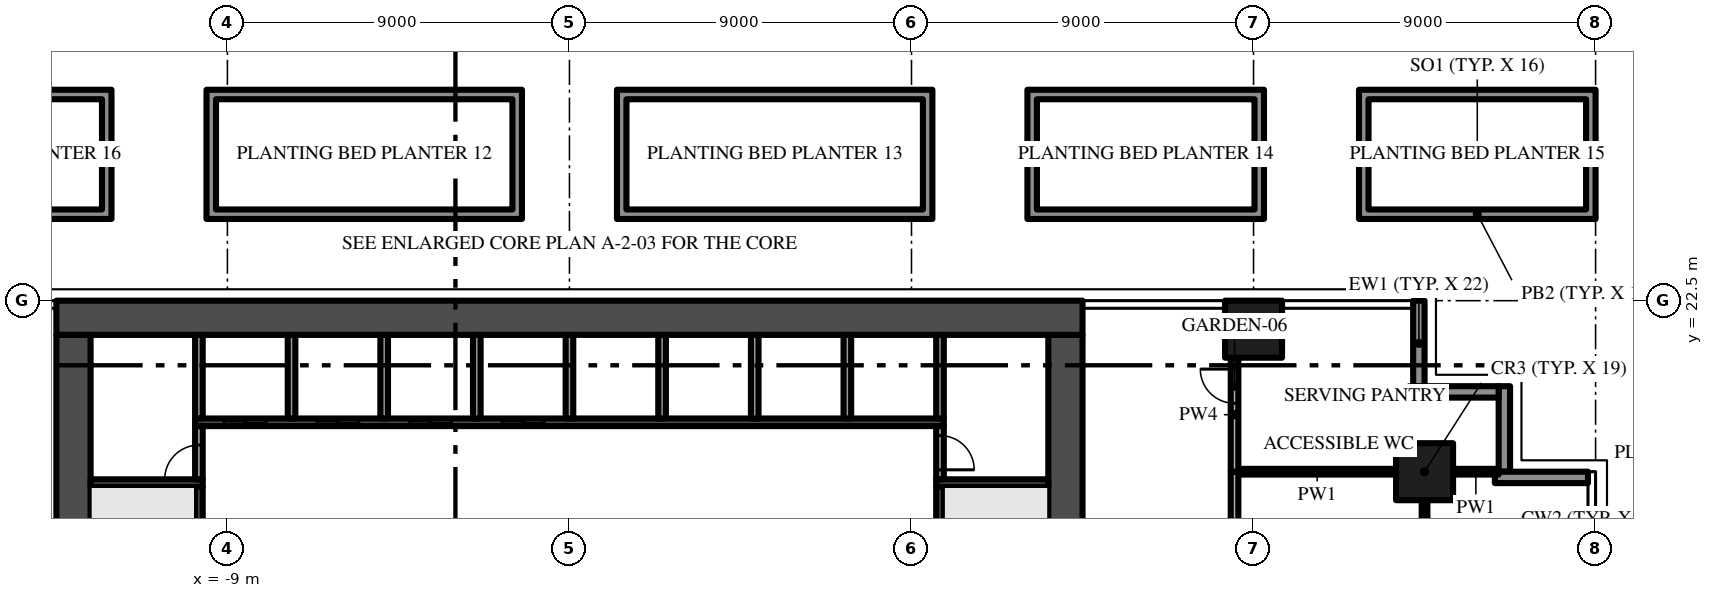
"""IFC4 building model, lengths in metres.
Left out: names, types, materials, properties, quantities, classifications, styles, units other than length and angle.
Written with IfcOpenShell. Run it as: python <this file> out.ifc"""

import sys

from ifc_helpers import new_model, si_unit, direction, frame, frame_2d, origin, origin_2d, place, context, subcontext, project, spatial, polyline, rectangle, outline, extrude, element, fill, save


model = new_model("IFC4")
c1 = context("Model", 3, precision=1e-05, world=origin(), true_north=direction((0.0, 1.0)))
c2 = subcontext(c1, "Body", "Model", "MODEL_VIEW")
j1 = project(units=[si_unit("LENGTHUNIT", "METRE"), si_unit("PLANEANGLEUNIT", "RADIAN")], contexts=[c1])
p1 = place(None, origin())
s1 = spatial("IfcSite", under=j1, at=p1, CompositionType="ELEMENT")
p2 = place(p1, origin())
s2 = spatial("IfcBuilding", under=s1, at=p2, CompositionType="ELEMENT")
p3 = place(p2, frame((0.0, 0.0, 10.5)))
s3 = spatial("IfcBuildingStorey", under=s2, at=p3, CompositionType="ELEMENT", Elevation=10.5)
p4 = place(p3, frame((13.05, 5.4, -0.35), z_axis=(0.0, 0.0, 1.0), x_axis=(0.0, 1.0, 0.0)))
e1 = element("IfcWall", 1, at=p4, inside=s3, PredefinedType="SHEAR", context=c2, shape_type="SweptSolid", body=[
    extrude(rectangle(XDim=16.2, YDim=0.9, at=frame_2d((8.1, 0.0))), origin(), (0.0, 0.0, 1.0), 4.55),
])
p5 = place(p4, frame((6.0, 0.0, 0.35)))
e2 = element("IfcOpeningElement", 2, at=p5, cuts=e1, PredefinedType="OPENING", context=c2, shape_type="SweptSolid", body=[
    extrude(rectangle(XDim=1.2, YDim=2.2, at=frame_2d((0.6, 1.1))), frame((0.0, 0.46, 0.0), z_axis=(0.0, -1.0, 0.0), x_axis=(1.0, 0.0, 0.0)), (0.0, 0.0, 1.0), 0.92),
])
p6 = place(p3, frame((13.5, 22.05, -0.35), z_axis=(0.0, 0.0, 1.0), x_axis=(-1.0, 0.0, 0.0)))
e3 = element("IfcWall", 3, at=p6, inside=s3, PredefinedType="SHEAR", context=c2, shape_type="SweptSolid", body=[
    extrude(rectangle(XDim=27.0, YDim=0.9, at=frame_2d((13.5, 0.0))), origin(), (0.0, 0.0, 1.0), 4.55),
])
p7 = place(p3, frame((-13.05, 21.6, -0.35), z_axis=(0.0, 0.0, 1.0), x_axis=(0.0, -1.0, 0.0)))
e4 = element("IfcWall", 4, at=p7, inside=s3, PredefinedType="SHEAR", context=c2, shape_type="SweptSolid", body=[
    extrude(rectangle(XDim=16.2, YDim=0.9, at=frame_2d((8.1, 0.0))), origin(), (0.0, 0.0, 1.0), 4.55),
])
p8 = place(p7, frame((9.0, 0.0, 0.35)))
e5 = element("IfcOpeningElement", 5, at=p8, cuts=e4, PredefinedType="OPENING", context=c2, shape_type="SweptSolid", body=[
    extrude(rectangle(XDim=1.2, YDim=2.2, at=frame_2d((0.6, 1.1))), frame((0.0, 0.46, 0.0), z_axis=(0.0, -1.0, 0.0), x_axis=(1.0, 0.0, 0.0)), (0.0, 0.0, 1.0), 0.92),
])
for number, where, z_axis, x_axis in (
    (6, (18.0, 21.75, 0.0), (0.0, 0.0, 1.0), (1.0, 0.0, 0.0)),
    (7, (22.5, 18.0, 0.0), (0.0, 0.0, 1.0), (1.0, 0.0, 0.0)),
):
    element("IfcColumn", number, at=place(p3, frame(where, z_axis=z_axis, x_axis=x_axis)), inside=s3, PredefinedType="COLUMN", context=c2, shape_type="SweptSolid", body=[
        extrude(rectangle(XDim=1.5, YDim=1.5, at=origin_2d()), origin(), (0.0, 0.0, 1.0), 4.2),
    ])
p9 = place(p3, frame((24.35, 17.85, 0.0), z_axis=(0.0, 0.0, 1.0), x_axis=(1.0, 0.0, 0.0)))
e8 = element("IfcWall", 8, at=p9, inside=s3, PredefinedType="SOLIDWALL", context=c2, shape_type="SweptSolid", body=[
    extrude(rectangle(XDim=2.45, YDim=0.3, at=frame_2d((1.225, 0.0))), origin(), (0.0, 0.0, 1.0), 4.2),
])
p10 = place(p3, frame((24.6, 20.25, 0.0), z_axis=(0.0, 0.0, 1.0), x_axis=(0.0, -1.0, 0.0)))
e9 = element("IfcWall", 9, at=p10, inside=s3, PredefinedType="SOLIDWALL", context=c2, shape_type="SweptSolid", body=[
    extrude(rectangle(XDim=2.25, YDim=0.3, at=frame_2d((1.125, 0.0))), origin(), (0.0, 0.0, 1.0), 4.2),
])
p11 = place(p3, frame((22.1, 20.1, 0.0), z_axis=(0.0, 0.0, 1.0), x_axis=(1.0, 0.0, 0.0)))
e10 = element("IfcWall", 10, at=p11, inside=s3, PredefinedType="SOLIDWALL", context=c2, shape_type="SweptSolid", body=[
    extrude(rectangle(XDim=2.35, YDim=0.3, at=frame_2d((1.175, 0.0))), origin(), (0.0, 0.0, 1.0), 4.2),
])
p12 = place(p3, frame((22.35, 22.5, 0.0), z_axis=(0.0, 0.0, 1.0), x_axis=(0.0, -1.0, 0.0)))
e11 = element("IfcWall", 11, at=p12, inside=s3, PredefinedType="SOLIDWALL", context=c2, shape_type="SweptSolid", body=[
    extrude(rectangle(XDim=2.25, YDim=0.3, at=frame_2d((1.125, 0.0))), origin(), (0.0, 0.0, 1.0), 4.2),
])
p13 = place(p3, frame((-12.6, 17.7, 0.0), z_axis=(0.0, 0.0, 1.0), x_axis=(1.0, 0.0, 0.0)))
e12 = element("IfcWall", 12, at=p13, inside=s3, PredefinedType="SHEAR", context=c2, shape_type="SweptSolid", body=[
    extrude(rectangle(XDim=2.95, YDim=0.2, at=frame_2d((1.475, 0.0))), origin(), (0.0, 0.0, 1.0), 4.2),
])
p14 = place(p3, frame((-9.75, 16.1, 0.0), z_axis=(0.0, 0.0, 1.0), x_axis=(0.0, 1.0, 0.0)))
e13 = element("IfcWall", 13, at=p14, inside=s3, PredefinedType="SHEAR", context=c2, shape_type="SweptSolid", body=[
    extrude(rectangle(XDim=1.5, YDim=0.2, at=frame_2d((0.75, 0.0))), origin(), (0.0, 0.0, 1.0), 4.2),
])
p15 = place(p3, frame((-9.75, 17.8, 0.0), z_axis=(0.0, 0.0, 1.0), x_axis=(0.0, 1.0, 0.0)))
e14 = element("IfcWall", 14, at=p15, inside=s3, PredefinedType="PARTITIONING", context=c2, shape_type="SweptSolid", body=[
    extrude(rectangle(XDim=1.4, YDim=0.2, at=frame_2d((0.7, 0.0))), origin(), (0.0, 0.0, 1.0), 4.2),
])
p16 = place(p15, origin())
e15 = element("IfcOpeningElement", 15, at=p16, cuts=e14, PredefinedType="OPENING", context=c2, shape_type="SweptSolid", body=[
    extrude(rectangle(XDim=0.9, YDim=2.1, at=frame_2d((0.45, 1.05))), frame((0.0, 0.11, 0.0), z_axis=(0.0, -1.0, 0.0), x_axis=(1.0, 0.0, 0.0)), (0.0, 0.0, 1.0), 0.22),
])
p17 = place(p3, frame((-9.85, 19.3, 0.0), z_axis=(0.0, 0.0, 1.0), x_axis=(1.0, 0.0, 0.0)))
e16 = element("IfcWall", 16, at=p17, inside=s3, PredefinedType="SHEAR", context=c2, shape_type="SweptSolid", body=[
    extrude(rectangle(XDim=19.7, YDim=0.2, at=frame_2d((9.85, 0.0))), origin(), (0.0, 0.0, 1.0), 4.2),
])
p18 = place(p17, frame((0.769, 0.0, 0.0)))
e17 = element("IfcOpeningElement", 17, at=p18, cuts=e16, PredefinedType="OPENING", context=c2, shape_type="SweptSolid", body=[
    extrude(rectangle(XDim=1.1, YDim=2.1, at=frame_2d((0.55, 1.05))), frame((0.0, 0.11, 0.0), z_axis=(0.0, -1.0, 0.0), x_axis=(1.0, 0.0, 0.0)), (0.0, 0.0, 1.0), 0.22),
])
p19 = place(p17, frame((3.206, 0.0, 0.0)))
e18 = element("IfcOpeningElement", 18, at=p19, cuts=e16, PredefinedType="OPENING", context=c2, shape_type="SweptSolid", body=[
    extrude(rectangle(XDim=1.1, YDim=2.1, at=frame_2d((0.55, 1.05))), frame((0.0, 0.11, 0.0), z_axis=(0.0, -1.0, 0.0), x_axis=(1.0, 0.0, 0.0)), (0.0, 0.0, 1.0), 0.22),
])
p20 = place(p17, frame((5.644, 0.0, 0.0)))
e19 = element("IfcOpeningElement", 19, at=p20, cuts=e16, PredefinedType="OPENING", context=c2, shape_type="SweptSolid", body=[
    extrude(rectangle(XDim=1.1, YDim=2.1, at=frame_2d((0.55, 1.05))), frame((0.0, 0.11, 0.0), z_axis=(0.0, -1.0, 0.0), x_axis=(1.0, 0.0, 0.0)), (0.0, 0.0, 1.0), 0.22),
])
p21 = place(p17, frame((8.081, 0.0, 0.0)))
e20 = element("IfcOpeningElement", 20, at=p21, cuts=e16, PredefinedType="OPENING", context=c2, shape_type="SweptSolid", body=[
    extrude(rectangle(XDim=1.1, YDim=2.1, at=frame_2d((0.55, 1.05))), frame((0.0, 0.11, 0.0), z_axis=(0.0, -1.0, 0.0), x_axis=(1.0, 0.0, 0.0)), (0.0, 0.0, 1.0), 0.22),
])
for number, where, z_axis, x_axis in (
    (21, (-9.75, 19.4, 0.0), (0.0, 0.0, 1.0), (0.0, 1.0, 0.0)),
    (22, (-7.312, 19.4, 0.0), (0.0, 0.0, 1.0), (0.0, 1.0, 0.0)),
    (23, (-4.875, 19.4, 0.0), (0.0, 0.0, 1.0), (0.0, 1.0, 0.0)),
    (24, (-2.438, 19.4, 0.0), (0.0, 0.0, 1.0), (0.0, 1.0, 0.0)),
    (25, (0.0, 19.4, 0.0), (0.0, 0.0, 1.0), (0.0, 1.0, 0.0)),
    (26, (2.438, 19.4, 0.0), (0.0, 0.0, 1.0), (0.0, 1.0, 0.0)),
    (27, (4.875, 19.4, 0.0), (0.0, 0.0, 1.0), (0.0, 1.0, 0.0)),
    (28, (7.312, 19.4, 0.0), (0.0, 0.0, 1.0), (0.0, 1.0, 0.0)),
):
    element("IfcWall", number, at=place(p3, frame(where, z_axis=z_axis, x_axis=x_axis)), inside=s3, PredefinedType="PARTITIONING", context=c2, shape_type="SweptSolid", body=[
        extrude(rectangle(XDim=2.2, YDim=0.2, at=frame_2d((1.1, 0.0))), origin(), (0.0, 0.0, 1.0), 4.2),
    ])
p22 = place(p3, frame((9.75, 16.1, 0.0), z_axis=(0.0, 0.0, 1.0), x_axis=(0.0, 1.0, 0.0)))
e29 = element("IfcWall", 29, at=p22, inside=s3, PredefinedType="SHEAR", context=c2, shape_type="SweptSolid", body=[
    extrude(rectangle(XDim=1.5, YDim=0.2, at=frame_2d((0.75, 0.0))), origin(), (0.0, 0.0, 1.0), 4.2),
])
p23 = place(p3, frame((9.65, 17.7, 0.0), z_axis=(0.0, 0.0, 1.0), x_axis=(1.0, 0.0, 0.0)))
e30 = element("IfcWall", 30, at=p23, inside=s3, PredefinedType="SHEAR", context=c2, shape_type="SweptSolid", body=[
    extrude(rectangle(XDim=2.95, YDim=0.2, at=frame_2d((1.475, 0.0))), origin(), (0.0, 0.0, 1.0), 4.2),
])
p24 = place(p3, frame((9.75, 19.2, 0.0), z_axis=(0.0, 0.0, 1.0), x_axis=(0.0, -1.0, 0.0)))
e31 = element("IfcWall", 31, at=p24, inside=s3, PredefinedType="PARTITIONING", context=c2, shape_type="SweptSolid", body=[
    extrude(rectangle(XDim=1.4, YDim=0.2, at=frame_2d((0.7, 0.0))), origin(), (0.0, 0.0, 1.0), 4.2),
])
p25 = place(p24, frame((0.25, 0.0, 0.0)))
e32 = element("IfcOpeningElement", 32, at=p25, cuts=e31, PredefinedType="OPENING", context=c2, shape_type="SweptSolid", body=[
    extrude(rectangle(XDim=0.9, YDim=2.1, at=frame_2d((0.45, 1.05))), frame((0.0, 0.11, 0.0), z_axis=(0.0, -1.0, 0.0), x_axis=(1.0, 0.0, 0.0)), (0.0, 0.0, 1.0), 0.22),
])
p26 = place(p3, frame((9.75, 19.4, 0.0), z_axis=(0.0, 0.0, 1.0), x_axis=(0.0, 1.0, 0.0)))
e33 = element("IfcWall", 33, at=p26, inside=s3, PredefinedType="PARTITIONING", context=c2, shape_type="SweptSolid", body=[
    extrude(rectangle(XDim=2.2, YDim=0.2, at=frame_2d((1.1, 0.0))), origin(), (0.0, 0.0, 1.0), 4.2),
])
p27 = place(p3, frame((17.6, 18.0, 0.0), z_axis=(0.0, 0.0, 1.0), x_axis=(1.0, 0.0, 0.0)))
e34 = element("IfcWall", 34, at=p27, inside=s3, PredefinedType="PARTITIONING", context=c2, shape_type="SweptSolid", body=[
    extrude(rectangle(XDim=4.15, YDim=0.15, at=frame_2d((2.075, 0.0))), origin(), (0.0, 0.0, 1.0), 4.2),
])
p28 = place(p3, frame((23.25, 18.0, 0.0), z_axis=(0.0, 0.0, 1.0), x_axis=(1.0, 0.0, 0.0)))
e35 = element("IfcWall", 35, at=p28, inside=s3, PredefinedType="PARTITIONING", context=c2, shape_type="SweptSolid", body=[
    extrude(rectangle(XDim=1.2, YDim=0.15, at=frame_2d((0.6, 0.0))), origin(), (0.0, 0.0, 1.0), 4.2),
])
p29 = place(p3, frame((17.5, 18.0, 0.0), z_axis=(0.0, 0.0, 1.0), x_axis=(0.0, -1.0, 0.0)))
e36 = element("IfcWall", 36, at=p29, inside=s3, PredefinedType="PARTITIONING", context=c2, shape_type="SweptSolid", body=[
    extrude(rectangle(XDim=3.7, YDim=0.2, at=frame_2d((1.85, 0.0))), origin(), (0.0, 0.0, 1.0), 4.2),
])
p30 = place(p29, frame((1.8, 0.0, 0.0)))
e37 = element("IfcOpeningElement", 37, at=p30, cuts=e36, PredefinedType="OPENING", context=c2, shape_type="SweptSolid", body=[
    extrude(rectangle(XDim=0.9, YDim=2.1, at=frame_2d((0.45, 1.05))), frame((0.0, 0.11, 0.0), z_axis=(0.0, -1.0, 0.0), x_axis=(1.0, 0.0, 0.0)), (0.0, 0.0, 1.0), 0.22),
])
p31 = place(p3, frame((17.5, 18.0, 0.0), z_axis=(0.0, 0.0, 1.0), x_axis=(0.0, 1.0, 0.0)))
e38 = element("IfcWall", 38, at=p31, inside=s3, PredefinedType="PARTITIONING", context=c2, shape_type="SweptSolid", body=[
    extrude(rectangle(XDim=3.0, YDim=0.2, at=frame_2d((1.5, 0.0))), origin(), (0.0, 0.0, 1.0), 4.2),
])
p32 = place(p31, frame((1.8, 0.0, 0.0)))
e39 = element("IfcOpeningElement", 39, at=p32, cuts=e38, PredefinedType="OPENING", context=c2, shape_type="SweptSolid", body=[
    extrude(rectangle(XDim=0.9, YDim=2.1, at=frame_2d((0.45, 1.05))), frame((0.0, 0.11, 0.0), z_axis=(0.0, -1.0, 0.0), x_axis=(1.0, 0.0, 0.0)), (0.0, 0.0, 1.0), 0.22),
])
p33 = place(p3, frame((22.5, 13.425, 0.0), z_axis=(0.0, 0.0, 1.0), x_axis=(0.0, 1.0, 0.0)))
e40 = element("IfcWall", 40, at=p33, inside=s3, PredefinedType="PARTITIONING", context=c2, shape_type="SweptSolid", body=[
    extrude(rectangle(XDim=3.825, YDim=0.15, at=frame_2d((1.913, 0.0))), origin(), (0.0, 0.0, 1.0), 4.2),
])
p34 = place(p3, frame((0.0, 0.0, 0.05)))
e41 = element("IfcWall", 41, at=p34, inside=s3, PredefinedType="USERDEFINED", context=c2, shape_type="SweptSolid", body=[
    extrude(outline(polyline([(-9.55, 24.65), (-1.25, 24.65), (-1.25, 28.05), (-9.55, 28.05), (-9.55, 24.65)]), holes=[polyline([(-9.3, 27.8), (-1.5, 27.8), (-1.5, 24.9), (-9.3, 24.9), (-9.3, 27.8)])]), origin(), (0.0, 0.0, 1.0), 0.9),
])
p35 = place(p3, frame((0.0, 0.0, 0.05)))
e42 = element("IfcWall", 42, at=p35, inside=s3, PredefinedType="USERDEFINED", context=c2, shape_type="SweptSolid", body=[
    extrude(outline(polyline([(1.25, 24.65), (9.55, 24.65), (9.55, 28.05), (1.25, 28.05), (1.25, 24.65)]), holes=[polyline([(1.5, 27.8), (9.3, 27.8), (9.3, 24.9), (1.5, 24.9), (1.5, 27.8)])]), origin(), (0.0, 0.0, 1.0), 0.9),
])
p36 = place(p3, frame((0.0, 0.0, 0.05)))
e43 = element("IfcWall", 43, at=p36, inside=s3, PredefinedType="USERDEFINED", context=c2, shape_type="SweptSolid", body=[
    extrude(outline(polyline([(12.05, 24.65), (18.275, 24.65), (18.275, 28.05), (12.05, 28.05), (12.05, 24.65)]), holes=[polyline([(12.3, 27.8), (18.025, 27.8), (18.025, 24.9), (12.3, 24.9), (12.3, 27.8)])]), origin(), (0.0, 0.0, 1.0), 0.9),
])
p37 = place(p3, frame((0.0, 0.0, 0.05)))
e44 = element("IfcWall", 44, at=p37, inside=s3, PredefinedType="USERDEFINED", context=c2, shape_type="SweptSolid", body=[
    extrude(outline(polyline([(20.775, 24.65), (27.0, 24.65), (27.0, 28.05), (20.775, 28.05), (20.775, 24.65)]), holes=[polyline([(21.025, 27.8), (26.75, 27.8), (26.75, 24.9), (21.025, 24.9), (21.025, 27.8)])]), origin(), (0.0, 0.0, 1.0), 0.9),
])
p38 = place(p3, frame((0.0, 0.0, 0.05)))
e45 = element("IfcWall", 45, at=p38, inside=s3, PredefinedType="USERDEFINED", context=c2, shape_type="SweptSolid", body=[
    extrude(outline(polyline([(-18.275, 24.65), (-12.05, 24.65), (-12.05, 28.05), (-18.275, 28.05), (-18.275, 24.65)]), holes=[polyline([(-18.025, 27.8), (-12.3, 27.8), (-12.3, 24.9), (-18.025, 24.9), (-18.025, 27.8)])]), origin(), (0.0, 0.0, 1.0), 0.9),
])
p39 = place(p18, origin())
e46 = element("IfcDoor", 46, at=p39, inside=s3, OperationType="SLIDING_TO_LEFT", PredefinedType="DOOR", context=c2, shape_type="SweptSolid", body=[
    extrude(rectangle(XDim=1.1, YDim=2.1, at=frame_2d((0.55, 1.05))), frame((0.0, 0.025, 0.0), z_axis=(0.0, -1.0, 0.0), x_axis=(1.0, 0.0, 0.0)), (0.0, 0.0, 1.0), 0.05),
])
fill(e17, e46)
p40 = place(p19, origin())
e47 = element("IfcDoor", 47, at=p40, inside=s3, OperationType="SLIDING_TO_LEFT", PredefinedType="DOOR", context=c2, shape_type="SweptSolid", body=[
    extrude(rectangle(XDim=1.1, YDim=2.1, at=frame_2d((0.55, 1.05))), frame((0.0, 0.025, 0.0), z_axis=(0.0, -1.0, 0.0), x_axis=(1.0, 0.0, 0.0)), (0.0, 0.0, 1.0), 0.05),
])
fill(e18, e47)
p41 = place(p20, origin())
e48 = element("IfcDoor", 48, at=p41, inside=s3, OperationType="SLIDING_TO_LEFT", PredefinedType="DOOR", context=c2, shape_type="SweptSolid", body=[
    extrude(rectangle(XDim=1.1, YDim=2.1, at=frame_2d((0.55, 1.05))), frame((0.0, 0.025, 0.0), z_axis=(0.0, -1.0, 0.0), x_axis=(1.0, 0.0, 0.0)), (0.0, 0.0, 1.0), 0.05),
])
fill(e19, e48)
p42 = place(p21, origin())
e49 = element("IfcDoor", 49, at=p42, inside=s3, OperationType="SLIDING_TO_LEFT", PredefinedType="DOOR", context=c2, shape_type="SweptSolid", body=[
    extrude(rectangle(XDim=1.1, YDim=2.1, at=frame_2d((0.55, 1.05))), frame((0.0, 0.025, 0.0), z_axis=(0.0, -1.0, 0.0), x_axis=(1.0, 0.0, 0.0)), (0.0, 0.0, 1.0), 0.05),
])
fill(e20, e49)
p43 = place(p16, origin())
e50 = element("IfcDoor", 50, at=p43, inside=s3, OperationType="SINGLE_SWING_LEFT", PredefinedType="DOOR", context=c2, shape_type="SweptSolid", body=[
    extrude(rectangle(XDim=0.9, YDim=2.1, at=frame_2d((0.45, 1.05))), frame((0.0, 0.025, 0.0), z_axis=(0.0, -1.0, 0.0), x_axis=(1.0, 0.0, 0.0)), (0.0, 0.0, 1.0), 0.05),
])
fill(e15, e50)
p44 = place(p25, origin())
e51 = element("IfcDoor", 51, at=p44, inside=s3, OperationType="SINGLE_SWING_RIGHT", PredefinedType="DOOR", context=c2, shape_type="SweptSolid", body=[
    extrude(rectangle(XDim=0.9, YDim=2.1, at=frame_2d((0.45, 1.05))), frame((0.0, 0.025, 0.0), z_axis=(0.0, -1.0, 0.0), x_axis=(1.0, 0.0, 0.0)), (0.0, 0.0, 1.0), 0.05),
])
fill(e32, e51)
p45 = place(p32, origin())
e52 = element("IfcDoor", 52, at=p45, inside=s3, OperationType="SINGLE_SWING_RIGHT", PredefinedType="DOOR", context=c2, shape_type="SweptSolid", body=[
    extrude(rectangle(XDim=0.9, YDim=2.1, at=frame_2d((0.45, 1.05))), frame((0.0, 0.025, 0.0), z_axis=(0.0, -1.0, 0.0), x_axis=(1.0, 0.0, 0.0)), (0.0, 0.0, 1.0), 0.05),
])
fill(e39, e52)
save(model, sys.argv[1])
